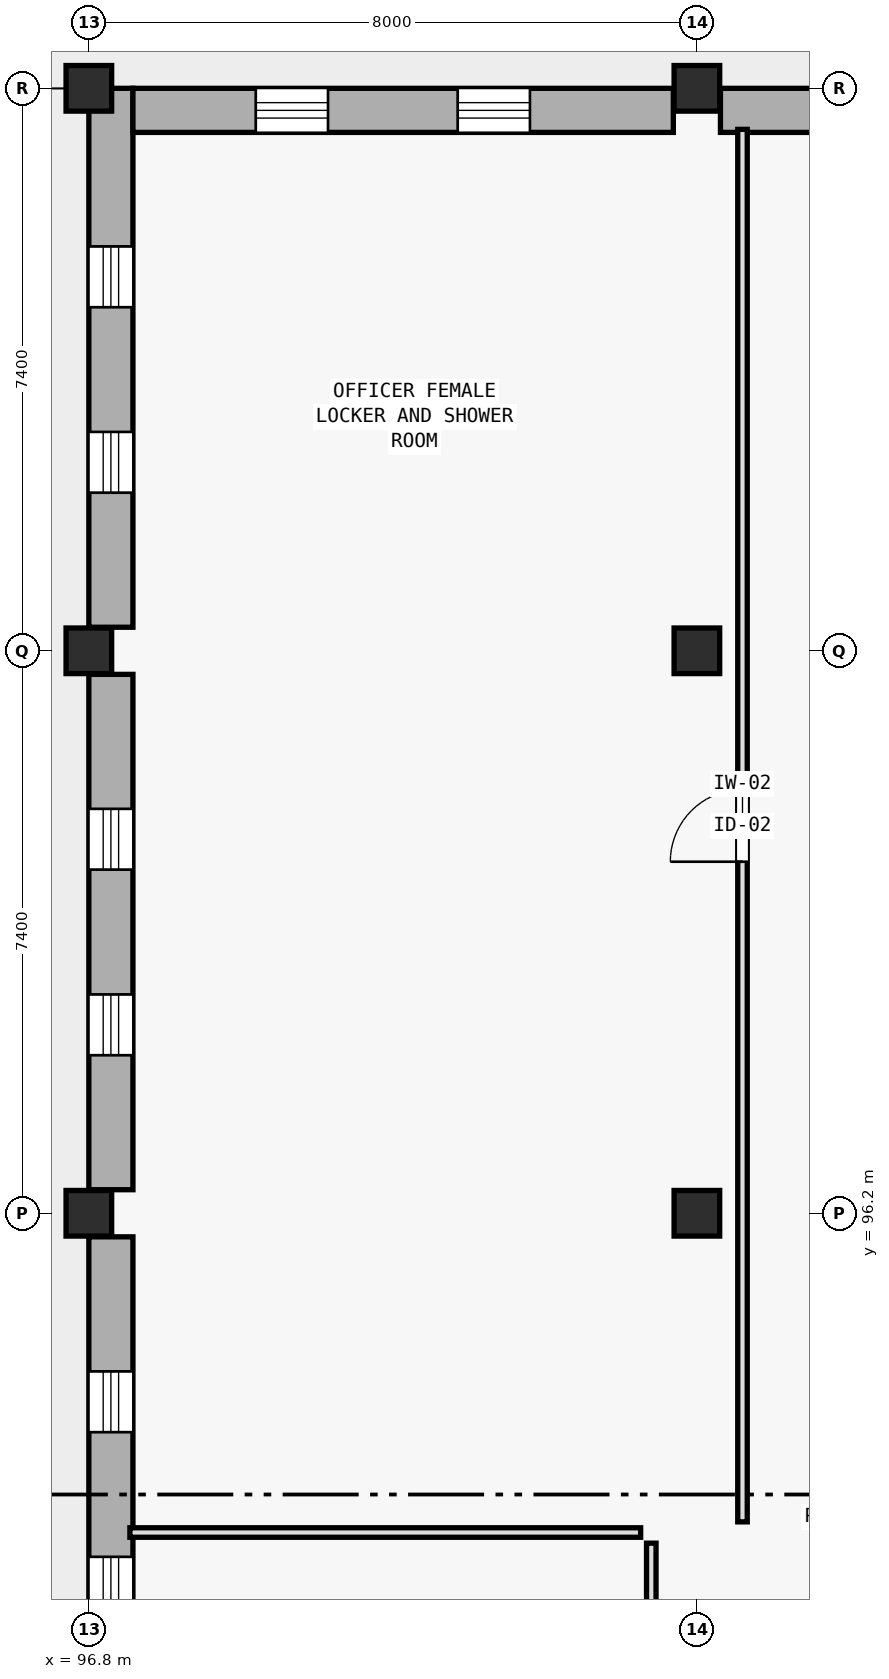
"""IFC4 building model, lengths in metres.
Left out: names, types, materials, properties, quantities, classifications, styles, units other than length and angle.
Written with IfcOpenShell. Run it as: python <this file> out.ifc"""

import sys

from ifc_helpers import new_model, si_unit, direction, frame, frame_2d, origin, origin_2d, place, context, subcontext, project, spatial, rectangle, extrude, element, fill, save


model = new_model("IFC4")
c1 = context("Model", 3, precision=1e-05, world=origin(), true_north=direction((0.0, 1.0)))
c2 = subcontext(c1, "Body", "Model", "MODEL_VIEW")
j1 = project(units=[si_unit("LENGTHUNIT", "METRE"), si_unit("PLANEANGLEUNIT", "RADIAN")], contexts=[c1])
p1 = place(None, origin())
s1 = spatial("IfcSite", under=j1, at=p1, CompositionType="ELEMENT")
p2 = place(p1, origin())
s2 = spatial("IfcBuilding", under=s1, at=p2, CompositionType="ELEMENT")
p3 = place(p2, origin())
s3 = spatial("IfcBuildingStorey", under=s2, at=p3, CompositionType="ELEMENT", Elevation=0.0)
for number, where, z_axis, x_axis in (
    (1, (96.8, 96.2, 0.0), (0.0, 0.0, 1.0), (1.0, 0.0, 0.0)),
    (2, (96.8, 103.6, 0.0), (0.0, 0.0, 1.0), (1.0, 0.0, 0.0)),
    (3, (96.8, 111.0, 0.0), (0.0, 0.0, 1.0), (1.0, 0.0, 0.0)),
    (4, (104.8, 96.2, 0.0), (0.0, 0.0, 1.0), (1.0, 0.0, 0.0)),
    (5, (104.8, 103.6, 0.0), (0.0, 0.0, 1.0), (1.0, 0.0, 0.0)),
    (6, (104.8, 111.0, 0.0), (0.0, 0.0, 1.0), (1.0, 0.0, 0.0)),
):
    element("IfcColumn", number, at=place(p3, frame(where, z_axis=z_axis, x_axis=x_axis)), inside=s3, PredefinedType="COLUMN", context=c2, shape_type="SweptSolid", body=[
        extrude(rectangle(XDim=0.6, YDim=0.6, at=origin_2d()), origin(), (0.0, 0.0, 1.0), 5.4),
    ])
p4 = place(p3, frame((97.09, 89.11, 0.0), z_axis=(0.0, 0.0, 1.0), x_axis=(0.0, 1.0, 0.0)))
e7 = element("IfcWall", 7, at=p4, inside=s3, PredefinedType="STANDARD", context=c2, shape_type="SweptSolid", body=[
    extrude(rectangle(XDim=6.78, YDim=0.58, at=frame_2d((3.39, 0.0))), origin(), (0.0, 0.0, 1.0), 5.14),
])
p5 = place(p4, frame((1.77, 0.0, 1.35)))
e8 = element("IfcOpeningElement", 8, at=p5, cuts=e7, PredefinedType="OPENING", context=c2, shape_type="SweptSolid", body=[
    extrude(rectangle(XDim=0.8, YDim=1.55, at=frame_2d((0.4, 0.775))), frame((0.0, 0.3, 0.0), z_axis=(0.0, -1.0, 0.0), x_axis=(1.0, 0.0, 0.0)), (0.0, 0.0, 1.0), 0.6),
])
p6 = place(p4, frame((4.21, 0.0, 1.35)))
e9 = element("IfcOpeningElement", 9, at=p6, cuts=e7, PredefinedType="OPENING", context=c2, shape_type="SweptSolid", body=[
    extrude(rectangle(XDim=0.8, YDim=1.55, at=frame_2d((0.4, 0.775))), frame((0.0, 0.3, 0.0), z_axis=(0.0, -1.0, 0.0), x_axis=(1.0, 0.0, 0.0)), (0.0, 0.0, 1.0), 0.6),
])
p7 = place(p3, frame((97.09, 96.51, 0.0), z_axis=(0.0, 0.0, 1.0), x_axis=(0.0, 1.0, 0.0)))
e10 = element("IfcWall", 10, at=p7, inside=s3, PredefinedType="STANDARD", context=c2, shape_type="SweptSolid", body=[
    extrude(rectangle(XDim=6.78, YDim=0.58, at=frame_2d((3.39, 0.0))), origin(), (0.0, 0.0, 1.0), 5.14),
])
p8 = place(p7, frame((1.77, 0.0, 0.9)))
e11 = element("IfcOpeningElement", 11, at=p8, cuts=e10, PredefinedType="OPENING", context=c2, shape_type="SweptSolid", body=[
    extrude(rectangle(XDim=0.8, YDim=1.95, at=frame_2d((0.4, 0.975))), frame((0.0, 0.3, 0.0), z_axis=(0.0, -1.0, 0.0), x_axis=(1.0, 0.0, 0.0)), (0.0, 0.0, 1.0), 0.6),
])
p9 = place(p7, frame((4.21, 0.0, 0.9)))
e12 = element("IfcOpeningElement", 12, at=p9, cuts=e10, PredefinedType="OPENING", context=c2, shape_type="SweptSolid", body=[
    extrude(rectangle(XDim=0.8, YDim=1.95, at=frame_2d((0.4, 0.975))), frame((0.0, 0.3, 0.0), z_axis=(0.0, -1.0, 0.0), x_axis=(1.0, 0.0, 0.0)), (0.0, 0.0, 1.0), 0.6),
])
p10 = place(p3, frame((97.09, 103.91, 0.0), z_axis=(0.0, 0.0, 1.0), x_axis=(0.0, 1.0, 0.0)))
e13 = element("IfcWall", 13, at=p10, inside=s3, PredefinedType="STANDARD", context=c2, shape_type="SweptSolid", body=[
    extrude(rectangle(XDim=7.09, YDim=0.58, at=frame_2d((3.545, 0.0))), origin(), (0.0, 0.0, 1.0), 5.14),
])
p11 = place(p10, frame((1.77, 0.0, 0.9)))
e14 = element("IfcOpeningElement", 14, at=p11, cuts=e13, PredefinedType="OPENING", context=c2, shape_type="SweptSolid", body=[
    extrude(rectangle(XDim=0.8, YDim=2.35, at=frame_2d((0.4, 1.175))), frame((0.0, 0.3, 0.0), z_axis=(0.0, -1.0, 0.0), x_axis=(1.0, 0.0, 0.0)), (0.0, 0.0, 1.0), 0.6),
])
p12 = place(p10, frame((4.21, 0.0, 0.9)))
e15 = element("IfcOpeningElement", 15, at=p12, cuts=e13, PredefinedType="OPENING", context=c2, shape_type="SweptSolid", body=[
    extrude(rectangle(XDim=0.8, YDim=2.35, at=frame_2d((0.4, 1.175))), frame((0.0, 0.3, 0.0), z_axis=(0.0, -1.0, 0.0), x_axis=(1.0, 0.0, 0.0)), (0.0, 0.0, 1.0), 0.6),
])
p13 = place(p3, frame((97.38, 110.71, 0.0), z_axis=(0.0, 0.0, 1.0), x_axis=(1.0, 0.0, 0.0)))
e16 = element("IfcWall", 16, at=p13, inside=s3, PredefinedType="STANDARD", context=c2, shape_type="SweptSolid", body=[
    extrude(rectangle(XDim=7.11, YDim=0.58, at=frame_2d((3.555, 0.0))), origin(), (0.0, 0.0, 1.0), 5.14),
])
p14 = place(p13, frame((1.617, 0.0, 0.9)))
e17 = element("IfcOpeningElement", 17, at=p14, cuts=e16, PredefinedType="OPENING", context=c2, shape_type="SweptSolid", body=[
    extrude(rectangle(XDim=0.95, YDim=1.8, at=frame_2d((0.475, 0.9))), frame((0.0, 0.3, 0.0), z_axis=(0.0, -1.0, 0.0), x_axis=(1.0, 0.0, 0.0)), (0.0, 0.0, 1.0), 0.6),
])
p15 = place(p13, frame((4.273, 0.0, 0.9)))
e18 = element("IfcOpeningElement", 18, at=p15, cuts=e16, PredefinedType="OPENING", context=c2, shape_type="SweptSolid", body=[
    extrude(rectangle(XDim=0.95, YDim=1.8, at=frame_2d((0.475, 0.9))), frame((0.0, 0.3, 0.0), z_axis=(0.0, -1.0, 0.0), x_axis=(1.0, 0.0, 0.0)), (0.0, 0.0, 1.0), 0.6),
])
p16 = place(p3, frame((105.11, 110.71, 0.0), z_axis=(0.0, 0.0, 1.0), x_axis=(1.0, 0.0, 0.0)))
e19 = element("IfcWall", 19, at=p16, inside=s3, PredefinedType="STANDARD", context=c2, shape_type="SweptSolid", body=[
    extrude(rectangle(XDim=7.38, YDim=0.58, at=frame_2d((3.69, 0.0))), origin(), (0.0, 0.0, 1.0), 5.14),
])
p17 = place(p16, frame((2.49, 0.0, 0.0)))
e20 = element("IfcOpeningElement", 20, at=p17, cuts=e19, PredefinedType="OPENING", context=c2, shape_type="SweptSolid", body=[
    extrude(rectangle(XDim=2.4, YDim=2.7, at=frame_2d((1.2, 1.35))), frame((0.0, 0.3, 0.0), z_axis=(0.0, -1.0, 0.0), x_axis=(1.0, 0.0, 0.0)), (0.0, 0.0, 1.0), 0.6),
])
p18 = place(p3, frame((97.34, 92.0, 0.0), z_axis=(0.0, 0.0, 1.0), x_axis=(1.0, 0.0, 0.0)))
e21 = element("IfcWall", 21, at=p18, inside=s3, PredefinedType="PARTITIONING", context=c2, shape_type="SweptSolid", body=[
    extrude(rectangle(XDim=6.72, YDim=0.125, at=frame_2d((3.36, 0.0))), origin(), (0.0, 0.0, 1.0), 4.76),
])
p19 = place(p3, frame((104.2, 74.34, 0.0), z_axis=(0.0, 0.0, 1.0), x_axis=(0.0, 1.0, 0.0)))
e22 = element("IfcWall", 22, at=p19, inside=s3, PredefinedType="PARTITIONING", context=c2, shape_type="SweptSolid", body=[
    extrude(rectangle(XDim=17.52, YDim=0.125, at=frame_2d((8.76, 0.0))), origin(), (0.0, 0.0, 1.0), 4.27),
])
p20 = place(p19, frame((8.285, 0.0, 0.0)))
e23 = element("IfcOpeningElement", 23, at=p20, cuts=e22, PredefinedType="OPENING", context=c2, shape_type="SweptSolid", body=[
    extrude(rectangle(XDim=0.95, YDim=2.1, at=frame_2d((0.475, 1.05))), frame((0.0, 0.073, 0.0), z_axis=(0.0, -1.0, 0.0), x_axis=(1.0, 0.0, 0.0)), (0.0, 0.0, 1.0), 0.145),
])
p21 = place(p3, frame((105.4, 92.14, 0.0), z_axis=(0.0, 0.0, 1.0), x_axis=(0.0, 1.0, 0.0)))
e24 = element("IfcWall", 24, at=p21, inside=s3, PredefinedType="PARTITIONING", context=c2, shape_type="SweptSolid", body=[
    extrude(rectangle(XDim=18.32, YDim=0.125, at=frame_2d((9.16, 0.0))), origin(), (0.0, 0.0, 1.0), 4.27),
])
p22 = place(p21, frame((8.685, 0.0, 0.0)))
e25 = element("IfcOpeningElement", 25, at=p22, cuts=e24, PredefinedType="OPENING", context=c2, shape_type="SweptSolid", body=[
    extrude(rectangle(XDim=0.95, YDim=2.1, at=frame_2d((0.475, 1.05))), frame((0.0, 0.073, 0.0), z_axis=(0.0, -1.0, 0.0), x_axis=(1.0, 0.0, 0.0)), (0.0, 0.0, 1.0), 0.145),
])
p23 = place(p5, origin())
e26 = element("IfcWindow", 26, at=p23, inside=s3, PartitioningType="SINGLE_PANEL", PredefinedType="WINDOW", context=c2, shape_type="SweptSolid", body=[
    extrude(rectangle(XDim=0.8, YDim=1.55, at=frame_2d((0.4, 0.775))), frame((0.0, 0.03, 0.0), z_axis=(0.0, -1.0, 0.0), x_axis=(1.0, 0.0, 0.0)), (0.0, 0.0, 1.0), 0.06),
])
fill(e8, e26)
p24 = place(p6, origin())
e27 = element("IfcWindow", 27, at=p24, inside=s3, PartitioningType="SINGLE_PANEL", PredefinedType="WINDOW", context=c2, shape_type="SweptSolid", body=[
    extrude(rectangle(XDim=0.8, YDim=1.55, at=frame_2d((0.4, 0.775))), frame((0.0, 0.03, 0.0), z_axis=(0.0, -1.0, 0.0), x_axis=(1.0, 0.0, 0.0)), (0.0, 0.0, 1.0), 0.06),
])
fill(e9, e27)
p25 = place(p8, origin())
e28 = element("IfcWindow", 28, at=p25, inside=s3, PartitioningType="SINGLE_PANEL", PredefinedType="WINDOW", context=c2, shape_type="SweptSolid", body=[
    extrude(rectangle(XDim=0.8, YDim=1.95, at=frame_2d((0.4, 0.975))), frame((0.0, 0.03, 0.0), z_axis=(0.0, -1.0, 0.0), x_axis=(1.0, 0.0, 0.0)), (0.0, 0.0, 1.0), 0.06),
])
fill(e11, e28)
p26 = place(p9, origin())
e29 = element("IfcWindow", 29, at=p26, inside=s3, PartitioningType="SINGLE_PANEL", PredefinedType="WINDOW", context=c2, shape_type="SweptSolid", body=[
    extrude(rectangle(XDim=0.8, YDim=1.95, at=frame_2d((0.4, 0.975))), frame((0.0, 0.03, 0.0), z_axis=(0.0, -1.0, 0.0), x_axis=(1.0, 0.0, 0.0)), (0.0, 0.0, 1.0), 0.06),
])
fill(e12, e29)
p27 = place(p11, origin())
e30 = element("IfcWindow", 30, at=p27, inside=s3, PartitioningType="SINGLE_PANEL", PredefinedType="WINDOW", context=c2, shape_type="SweptSolid", body=[
    extrude(rectangle(XDim=0.8, YDim=2.35, at=frame_2d((0.4, 1.175))), frame((0.0, 0.03, 0.0), z_axis=(0.0, -1.0, 0.0), x_axis=(1.0, 0.0, 0.0)), (0.0, 0.0, 1.0), 0.06),
])
fill(e14, e30)
p28 = place(p12, origin())
e31 = element("IfcWindow", 31, at=p28, inside=s3, PartitioningType="SINGLE_PANEL", PredefinedType="WINDOW", context=c2, shape_type="SweptSolid", body=[
    extrude(rectangle(XDim=0.8, YDim=2.35, at=frame_2d((0.4, 1.175))), frame((0.0, 0.03, 0.0), z_axis=(0.0, -1.0, 0.0), x_axis=(1.0, 0.0, 0.0)), (0.0, 0.0, 1.0), 0.06),
])
fill(e15, e31)
p29 = place(p14, origin())
e32 = element("IfcWindow", 32, at=p29, inside=s3, PartitioningType="SINGLE_PANEL", PredefinedType="WINDOW", context=c2, shape_type="SweptSolid", body=[
    extrude(rectangle(XDim=0.95, YDim=1.8, at=frame_2d((0.475, 0.9))), frame((0.0, 0.03, 0.0), z_axis=(0.0, -1.0, 0.0), x_axis=(1.0, 0.0, 0.0)), (0.0, 0.0, 1.0), 0.06),
])
fill(e17, e32)
p30 = place(p15, origin())
e33 = element("IfcWindow", 33, at=p30, inside=s3, PartitioningType="SINGLE_PANEL", PredefinedType="WINDOW", context=c2, shape_type="SweptSolid", body=[
    extrude(rectangle(XDim=0.95, YDim=1.8, at=frame_2d((0.475, 0.9))), frame((0.0, 0.03, 0.0), z_axis=(0.0, -1.0, 0.0), x_axis=(1.0, 0.0, 0.0)), (0.0, 0.0, 1.0), 0.06),
])
fill(e18, e33)
p31 = place(p22, origin())
e34 = element("IfcDoor", 34, at=p31, inside=s3, OperationType="SINGLE_SWING_LEFT", PredefinedType="DOOR", context=c2, shape_type="SweptSolid", body=[
    extrude(rectangle(XDim=0.95, YDim=2.1, at=frame_2d((0.475, 1.05))), frame((0.0, 0.025, 0.0), z_axis=(0.0, -1.0, 0.0), x_axis=(1.0, 0.0, 0.0)), (0.0, 0.0, 1.0), 0.05),
])
fill(e25, e34)
save(model, sys.argv[1])
